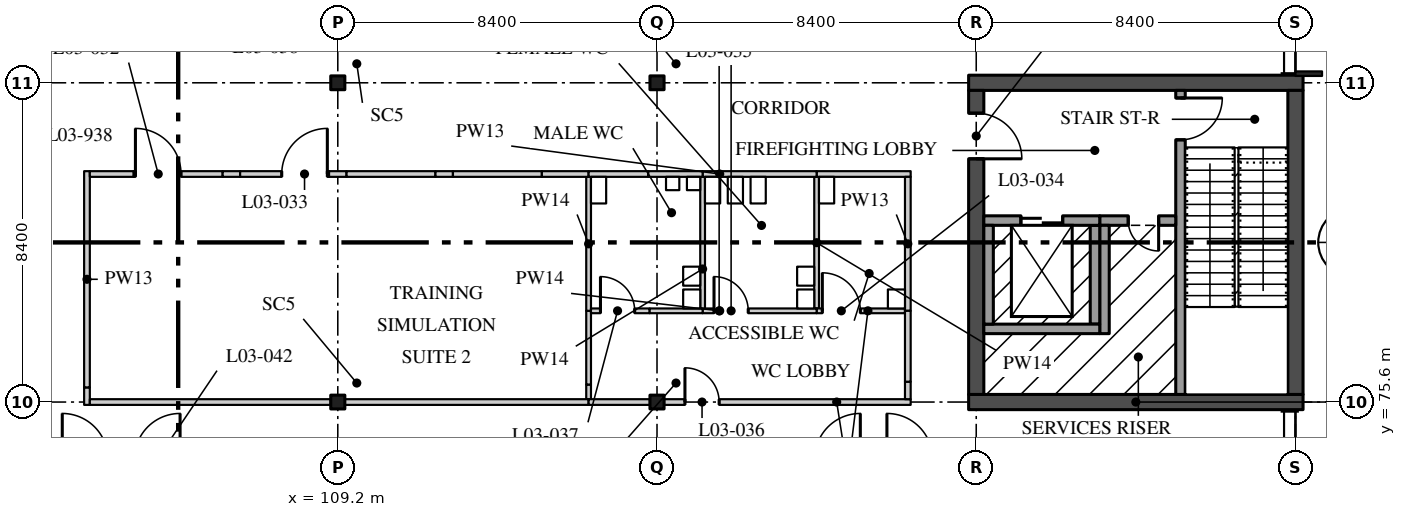
"""IFC4 building model, lengths in metres.
Left out: names, types, materials, properties, quantities, classifications, styles, units other than length and angle.
Written with IfcOpenShell. Run it as: python <this file> out.ifc"""

import sys

from ifc_helpers import new_model, si_unit, direction, frame, frame_2d, origin, origin_2d, place, context, subcontext, project, spatial, rectangle, i_section, extrude, element, fill, save


model = new_model("IFC4")
c1 = context("Model", 3, precision=1e-05, world=origin(), true_north=direction((0.0, 1.0)))
c2 = subcontext(c1, "Body", "Model", "MODEL_VIEW")
j1 = project(units=[si_unit("LENGTHUNIT", "METRE"), si_unit("PLANEANGLEUNIT", "RADIAN")], contexts=[c1])
p1 = place(None, origin())
s1 = spatial("IfcSite", under=j1, at=p1, CompositionType="ELEMENT")
p2 = place(p1, origin())
s2 = spatial("IfcBuilding", under=s1, at=p2, CompositionType="ELEMENT")
p3 = place(p2, frame((0.0, 0.0, 14.4)))
s3 = spatial("IfcBuildingStorey", under=s2, at=p3, CompositionType="ELEMENT", Elevation=14.4)
for number, where, z_axis, x_axis in (
    (1, (109.2, 75.6, 0.0), (0.0, 0.0, 1.0), (1.0, 0.0, 0.0)),
    (2, (109.2, 84.0, 0.0), (0.0, 0.0, 1.0), (1.0, 0.0, 0.0)),
    (3, (117.6, 75.6, 0.0), (0.0, 0.0, 1.0), (1.0, 0.0, 0.0)),
    (4, (117.6, 84.0, 0.0), (0.0, 0.0, 1.0), (1.0, 0.0, 0.0)),
):
    element("IfcColumn", number, at=place(p3, frame(where, z_axis=z_axis, x_axis=x_axis)), inside=s3, PredefinedType="COLUMN", context=c2, shape_type="SweptSolid", body=[
        extrude(i_section(OverallWidth=0.371, OverallDepth=0.363, WebThickness=0.013, FlangeThickness=0.022, FilletRadius=0.015, at=origin_2d()), origin(), (0.0, 0.0, 1.0), 4.37),
    ])
for number, where, z_axis, x_axis in (
    (5, (125.8, 75.6, 0.0), (0.0, 0.0, 1.0), (1.0, 0.0, 0.0)),
    (6, (125.8, 84.0, 0.0), (0.0, 0.0, 1.0), (1.0, 0.0, 0.0)),
):
    element("IfcWall", number, at=place(p3, frame(where, z_axis=z_axis, x_axis=x_axis)), inside=s3, PredefinedType="SHEAR", context=c2, shape_type="SweptSolid", body=[
        extrude(rectangle(XDim=8.8, YDim=0.4, at=frame_2d((4.4, 0.0))), origin(), (0.0, 0.0, 1.0), 4.37),
    ])
p4 = place(p3, frame((126.0, 75.8, 0.0), z_axis=(0.0, 0.0, 1.0), x_axis=(0.0, 1.0, 0.0)))
e7 = element("IfcWall", 7, at=p4, inside=s3, PredefinedType="SHEAR", context=c2, shape_type="SweptSolid", body=[
    extrude(rectangle(XDim=8.0, YDim=0.4, at=frame_2d((4.0, 0.0))), origin(), (0.0, 0.0, 1.0), 4.37),
])
p5 = place(p4, frame((6.2, 0.0, 0.0)))
e8 = element("IfcOpeningElement", 8, at=p5, cuts=e7, PredefinedType="OPENING", context=c2, shape_type="SweptSolid", body=[
    extrude(rectangle(XDim=1.2, YDim=2.1, at=frame_2d((0.6, 1.05))), frame((0.0, 0.21, 0.0), z_axis=(0.0, -1.0, 0.0), x_axis=(1.0, 0.0, 0.0)), (0.0, 0.0, 1.0), 0.42),
])
p6 = place(p3, frame((134.4, 75.8, 0.0), z_axis=(0.0, 0.0, 1.0), x_axis=(0.0, 1.0, 0.0)))
e9 = element("IfcWall", 9, at=p6, inside=s3, PredefinedType="SHEAR", context=c2, shape_type="SweptSolid", body=[
    extrude(rectangle(XDim=8.0, YDim=0.4, at=frame_2d((4.0, 0.0))), origin(), (0.0, 0.0, 1.0), 4.37),
])
p7 = place(p3, frame((131.375, 83.8, 0.0), z_axis=(0.0, 0.0, 1.0), x_axis=(0.0, -1.0, 0.0)))
e10 = element("IfcWall", 10, at=p7, inside=s3, PredefinedType="SOLIDWALL", context=c2, shape_type="SweptSolid", body=[
    extrude(rectangle(XDim=8.0, YDim=0.25, at=frame_2d((4.0, 0.0))), origin(), (0.0, 0.0, 1.0), 4.37),
])
p8 = place(p7, frame((0.2, 0.0, 0.0)))
e11 = element("IfcOpeningElement", 11, at=p8, cuts=e10, PredefinedType="OPENING", context=c2, shape_type="SweptSolid", body=[
    extrude(rectangle(XDim=1.1, YDim=2.1, at=frame_2d((0.55, 1.05))), frame((0.0, 0.135, 0.0), z_axis=(0.0, -1.0, 0.0), x_axis=(1.0, 0.0, 0.0)), (0.0, 0.0, 1.0), 0.27),
])
p9 = place(p3, frame((131.25, 80.375, 0.0), z_axis=(0.0, 0.0, 1.0), x_axis=(-1.0, 0.0, 0.0)))
e12 = element("IfcWall", 12, at=p9, inside=s3, PredefinedType="SOLIDWALL", context=c2, shape_type="SweptSolid", body=[
    extrude(rectangle(XDim=2.0, YDim=0.25, at=frame_2d((1.0, 0.0))), origin(), (0.0, 0.0, 1.0), 4.37),
])
p10 = place(p9, frame((0.45, 0.0, 0.0)))
e13 = element("IfcOpeningElement", 13, at=p10, cuts=e12, PredefinedType="OPENING", context=c2, shape_type="SweptSolid", body=[
    extrude(rectangle(XDim=0.8, YDim=2.1, at=frame_2d((0.4, 1.05))), frame((0.0, 0.135, 0.0), z_axis=(0.0, -1.0, 0.0), x_axis=(1.0, 0.0, 0.0)), (0.0, 0.0, 1.0), 0.27),
])
p11 = place(p3, frame((129.375, 80.25, 0.0), z_axis=(0.0, 0.0, 1.0), x_axis=(0.0, -1.0, 0.0)))
e14 = element("IfcWall", 14, at=p11, inside=s3, PredefinedType="SOLIDWALL", context=c2, shape_type="SweptSolid", body=[
    extrude(rectangle(XDim=2.85, YDim=0.25, at=frame_2d((1.425, 0.0))), origin(), (0.0, 0.0, 1.0), 4.37),
])
p12 = place(p3, frame((129.125, 77.65, 0.0), z_axis=(0.0, 0.0, 1.0), x_axis=(0.0, 1.0, 0.0)))
e15 = element("IfcWall", 15, at=p12, inside=s3, PredefinedType="SOLIDWALL", context=c2, shape_type="SweptSolid", body=[
    extrude(rectangle(XDim=2.6, YDim=0.25, at=frame_2d((1.3, 0.0))), origin(), (0.0, 0.0, 1.0), 4.37),
])
p13 = place(p3, frame((126.2, 80.375, 0.0), z_axis=(0.0, 0.0, 1.0), x_axis=(1.0, 0.0, 0.0)))
e16 = element("IfcWall", 16, at=p13, inside=s3, PredefinedType="SOLIDWALL", context=c2, shape_type="SweptSolid", body=[
    extrude(rectangle(XDim=3.05, YDim=0.25, at=frame_2d((1.525, 0.0))), origin(), (0.0, 0.0, 1.0), 4.37),
])
p14 = place(p13, frame((0.975, 0.0, 0.0)))
e17 = element("IfcOpeningElement", 17, at=p14, cuts=e16, PredefinedType="OPENING", context=c2, shape_type="SweptSolid", body=[
    extrude(rectangle(XDim=1.1, YDim=2.1, at=frame_2d((0.55, 1.05))), frame((0.0, 0.135, 0.0), z_axis=(0.0, -1.0, 0.0), x_axis=(1.0, 0.0, 0.0)), (0.0, 0.0, 1.0), 0.27),
])
p15 = place(p3, frame((126.2, 77.525, 0.0), z_axis=(0.0, 0.0, 1.0), x_axis=(1.0, 0.0, 0.0)))
e18 = element("IfcWall", 18, at=p15, inside=s3, PredefinedType="SOLIDWALL", context=c2, shape_type="SweptSolid", body=[
    extrude(rectangle(XDim=3.05, YDim=0.25, at=frame_2d((1.525, 0.0))), origin(), (0.0, 0.0, 1.0), 4.37),
])
p16 = place(p3, frame((126.325, 77.65, 0.0), z_axis=(0.0, 0.0, 1.0), x_axis=(0.0, 1.0, 0.0)))
e19 = element("IfcWall", 19, at=p16, inside=s3, PredefinedType="SOLIDWALL", context=c2, shape_type="SweptSolid", body=[
    extrude(rectangle(XDim=2.6, YDim=0.25, at=frame_2d((1.3, 0.0))), origin(), (0.0, 0.0, 1.0), 4.37),
])
p17 = place(p3, frame((115.8, 75.675, 0.0), z_axis=(0.0, 0.0, 1.0), x_axis=(0.0, 1.0, 0.0)))
e20 = element("IfcWall", 20, at=p17, inside=s3, PredefinedType="PARTITIONING", context=c2, shape_type="SweptSolid", body=[
    extrude(rectangle(XDim=0.385, YDim=0.125, at=frame_2d((0.192, 0.0))), origin(), (0.0, 0.0, 1.0), 3.746),
])
p18 = place(p3, frame((115.8, 76.06, 0.0), z_axis=(0.0, 0.0, 1.0), x_axis=(0.0, 1.0, 0.0)))
e21 = element("IfcWall", 21, at=p18, inside=s3, PredefinedType="PARTITIONING", context=c2, shape_type="SweptSolid", body=[
    extrude(rectangle(XDim=1.94, YDim=0.125, at=frame_2d((0.97, 0.0))), origin(), (0.0, 0.0, 1.0), 4.37),
])
p19 = place(p3, frame((115.8, 78.0, 0.0), z_axis=(0.0, 0.0, 1.0), x_axis=(0.0, 1.0, 0.0)))
e22 = element("IfcWall", 22, at=p19, inside=s3, PredefinedType="PARTITIONING", context=c2, shape_type="SweptSolid", body=[
    extrude(rectangle(XDim=3.525, YDim=0.125, at=frame_2d((1.762, 0.0))), origin(), (0.0, 0.0, 1.0), 4.37),
])
p20 = place(p3, frame((102.6, 75.525, 0.0), z_axis=(0.0, 0.0, 1.0), x_axis=(0.0, 1.0, 0.0)))
e23 = element("IfcWall", 23, at=p20, inside=s3, PredefinedType="PARTITIONING", context=c2, shape_type="SweptSolid", body=[
    extrude(rectangle(XDim=0.46, YDim=0.15, at=frame_2d((0.23, 0.0))), origin(), (0.0, 0.0, 1.0), 3.746),
])
p21 = place(p3, frame((102.6, 75.985, 0.0), z_axis=(0.0, 0.0, 1.0), x_axis=(0.0, 1.0, 0.0)))
e24 = element("IfcWall", 24, at=p21, inside=s3, PredefinedType="PARTITIONING", context=c2, shape_type="SweptSolid", body=[
    extrude(rectangle(XDim=5.69, YDim=0.15, at=frame_2d((2.845, 0.0))), origin(), (0.0, 0.0, 1.0), 4.37),
])
p22 = place(p3, frame((102.675, 75.6, 0.0), z_axis=(0.0, 0.0, 1.0), x_axis=(1.0, 0.0, 0.0)))
e25 = element("IfcWall", 25, at=p22, inside=s3, PredefinedType="PARTITIONING", context=c2, shape_type="SweptSolid", body=[
    extrude(rectangle(XDim=6.339, YDim=0.15, at=frame_2d((3.169, 0.0))), origin(), (0.0, 0.0, 1.0), 3.746),
])
p23 = place(p3, frame((109.386, 75.6, 0.0), z_axis=(0.0, 0.0, 1.0), x_axis=(1.0, 0.0, 0.0)))
e26 = element("IfcWall", 26, at=p23, inside=s3, PredefinedType="PARTITIONING", context=c2, shape_type="SweptSolid", body=[
    extrude(rectangle(XDim=6.414, YDim=0.15, at=frame_2d((3.207, 0.0))), origin(), (0.0, 0.0, 1.0), 3.746),
])
p24 = place(p3, frame((102.675, 81.6, 0.0), z_axis=(0.0, 0.0, 1.0), x_axis=(1.0, 0.0, 0.0)))
e27 = element("IfcWall", 27, at=p24, inside=s3, PredefinedType="PARTITIONING", context=c2, shape_type="SweptSolid", body=[
    extrude(rectangle(XDim=1.155, YDim=0.15, at=frame_2d((0.578, 0.0))), origin(), (0.0, 0.0, 1.0), 3.895),
])
p25 = place(p3, frame((103.83, 81.6, 0.0), z_axis=(0.0, 0.0, 1.0), x_axis=(1.0, 0.0, 0.0)))
e28 = element("IfcWall", 28, at=p25, inside=s3, PredefinedType="PARTITIONING", context=c2, shape_type="SweptSolid", body=[
    extrude(rectangle(XDim=2.34, YDim=0.15, at=frame_2d((1.17, 0.0))), origin(), (0.0, 0.0, 1.0), 4.37),
])
p26 = place(p25, frame((0.045, 0.0, 0.0)))
e29 = element("IfcOpeningElement", 29, at=p26, cuts=e28, PredefinedType="OPENING", context=c2, shape_type="SweptSolid", body=[
    extrude(rectangle(XDim=1.2, YDim=2.4, at=frame_2d((0.6, 1.2))), frame((0.0, 0.085, 0.0), z_axis=(0.0, -1.0, 0.0), x_axis=(1.0, 0.0, 0.0)), (0.0, 0.0, 1.0), 0.17),
])
p27 = place(p3, frame((106.17, 81.6, 0.0), z_axis=(0.0, 0.0, 1.0), x_axis=(1.0, 0.0, 0.0)))
e30 = element("IfcWall", 30, at=p27, inside=s3, PredefinedType="PARTITIONING", context=c2, shape_type="SweptSolid", body=[
    extrude(rectangle(XDim=0.46, YDim=0.15, at=frame_2d((0.23, 0.0))), origin(), (0.0, 0.0, 1.0), 3.895),
])
p28 = place(p3, frame((106.63, 81.6, 0.0), z_axis=(0.0, 0.0, 1.0), x_axis=(1.0, 0.0, 0.0)))
e31 = element("IfcWall", 31, at=p28, inside=s3, PredefinedType="PARTITIONING", context=c2, shape_type="SweptSolid", body=[
    extrude(rectangle(XDim=2.34, YDim=0.15, at=frame_2d((1.17, 0.0))), origin(), (0.0, 0.0, 1.0), 4.37),
])
p29 = place(p28, frame((1.095, 0.0, 0.0)))
e32 = element("IfcOpeningElement", 32, at=p29, cuts=e31, PredefinedType="OPENING", context=c2, shape_type="SweptSolid", body=[
    extrude(rectangle(XDim=1.2, YDim=2.4, at=frame_2d((0.6, 1.2))), frame((0.0, 0.085, 0.0), z_axis=(0.0, -1.0, 0.0), x_axis=(1.0, 0.0, 0.0)), (0.0, 0.0, 1.0), 0.17),
])
p30 = place(p3, frame((108.97, 81.6, 0.0), z_axis=(0.0, 0.0, 1.0), x_axis=(1.0, 0.0, 0.0)))
e33 = element("IfcWall", 33, at=p30, inside=s3, PredefinedType="PARTITIONING", context=c2, shape_type="SweptSolid", body=[
    extrude(rectangle(XDim=0.46, YDim=0.15, at=frame_2d((0.23, 0.0))), origin(), (0.0, 0.0, 1.0), 3.746),
])
p31 = place(p3, frame((109.43, 81.6, 0.0), z_axis=(0.0, 0.0, 1.0), x_axis=(1.0, 0.0, 0.0)))
e34 = element("IfcWall", 34, at=p31, inside=s3, PredefinedType="PARTITIONING", context=c2, shape_type="SweptSolid", body=[
    extrude(rectangle(XDim=2.34, YDim=0.15, at=frame_2d((1.17, 0.0))), origin(), (0.0, 0.0, 1.0), 4.37),
])
p32 = place(p3, frame((111.77, 81.6, 0.0), z_axis=(0.0, 0.0, 1.0), x_axis=(1.0, 0.0, 0.0)))
e35 = element("IfcWall", 35, at=p32, inside=s3, PredefinedType="PARTITIONING", context=c2, shape_type="SweptSolid", body=[
    extrude(rectangle(XDim=0.46, YDim=0.15, at=frame_2d((0.23, 0.0))), origin(), (0.0, 0.0, 1.0), 3.895),
])
p33 = place(p3, frame((112.23, 81.6, 0.0), z_axis=(0.0, 0.0, 1.0), x_axis=(1.0, 0.0, 0.0)))
e36 = element("IfcWall", 36, at=p33, inside=s3, PredefinedType="PARTITIONING", context=c2, shape_type="SweptSolid", body=[
    extrude(rectangle(XDim=2.34, YDim=0.15, at=frame_2d((1.17, 0.0))), origin(), (0.0, 0.0, 1.0), 4.37),
])
p34 = place(p3, frame((114.57, 81.6, 0.0), z_axis=(0.0, 0.0, 1.0), x_axis=(1.0, 0.0, 0.0)))
e37 = element("IfcWall", 37, at=p34, inside=s3, PredefinedType="PARTITIONING", context=c2, shape_type="SweptSolid", body=[
    extrude(rectangle(XDim=1.23, YDim=0.15, at=frame_2d((0.615, 0.0))), origin(), (0.0, 0.0, 1.0), 3.895),
])
p35 = place(p3, frame((121.8, 78.062, 0.0), z_axis=(0.0, 0.0, 1.0), x_axis=(0.0, 1.0, 0.0)))
e38 = element("IfcWall", 38, at=p35, inside=s3, PredefinedType="PARTITIONING", context=c2, shape_type="SweptSolid", body=[
    extrude(rectangle(XDim=3.463, YDim=0.125, at=frame_2d((1.731, 0.0))), origin(), (0.0, 0.0, 1.0), 4.37),
])
p36 = place(p3, frame((121.8, 78.0, 0.0), z_axis=(0.0, 0.0, 1.0), x_axis=(1.0, 0.0, 0.0)))
e39 = element("IfcWall", 39, at=p36, inside=s3, PredefinedType="PARTITIONING", context=c2, shape_type="SweptSolid", body=[
    extrude(rectangle(XDim=2.325, YDim=0.125, at=frame_2d((1.163, 0.0))), origin(), (0.0, 0.0, 1.0), 3.895),
])
p37 = place(p36, frame((0.15, 0.0, 0.0)))
e40 = element("IfcOpeningElement", 40, at=p37, cuts=e39, PredefinedType="OPENING", context=c2, shape_type="SweptSolid", body=[
    extrude(rectangle(XDim=1.0, YDim=2.1, at=frame_2d((0.5, 1.05))), frame((0.0, 0.073, 0.0), z_axis=(0.0, -1.0, 0.0), x_axis=(1.0, 0.0, 0.0)), (0.0, 0.0, 1.0), 0.145),
])
p38 = place(p3, frame((121.8, 81.6, 0.0), z_axis=(0.0, 0.0, 1.0), x_axis=(1.0, 0.0, 0.0)))
e41 = element("IfcWall", 41, at=p38, inside=s3, PredefinedType="PARTITIONING", context=c2, shape_type="SweptSolid", body=[
    extrude(rectangle(XDim=2.475, YDim=0.15, at=frame_2d((1.237, 0.0))), origin(), (0.0, 0.0, 1.0), 3.895),
])
p39 = place(p3, frame((124.2, 78.0, 0.0), z_axis=(0.0, 0.0, 1.0), x_axis=(0.0, 1.0, 0.0)))
e42 = element("IfcWall", 42, at=p39, inside=s3, PredefinedType="PARTITIONING", context=c2, shape_type="SweptSolid", body=[
    extrude(rectangle(XDim=3.525, YDim=0.15, at=frame_2d((1.762, 0.0))), origin(), (0.0, 0.0, 1.0), 4.37),
])
p40 = place(p3, frame((118.8, 78.0, 0.0), z_axis=(0.0, 0.0, 1.0), x_axis=(1.0, 0.0, 0.0)))
e43 = element("IfcWall", 43, at=p40, inside=s3, PredefinedType="PARTITIONING", context=c2, shape_type="SweptSolid", body=[
    extrude(rectangle(XDim=3.0, YDim=0.125, at=frame_2d((1.5, 0.0))), origin(), (0.0, 0.0, 1.0), 3.895),
])
p41 = place(p40, frame((0.3, 0.0, 0.0)))
e44 = element("IfcOpeningElement", 44, at=p41, cuts=e43, PredefinedType="OPENING", context=c2, shape_type="SweptSolid", body=[
    extrude(rectangle(XDim=0.9, YDim=2.1, at=frame_2d((0.45, 1.05))), frame((0.0, 0.073, 0.0), z_axis=(0.0, -1.0, 0.0), x_axis=(1.0, 0.0, 0.0)), (0.0, 0.0, 1.0), 0.145),
])
p42 = place(p3, frame((118.8, 78.062, 0.0), z_axis=(0.0, 0.0, 1.0), x_axis=(0.0, 1.0, 0.0)))
e45 = element("IfcWall", 45, at=p42, inside=s3, PredefinedType="PARTITIONING", context=c2, shape_type="SweptSolid", body=[
    extrude(rectangle(XDim=3.463, YDim=0.125, at=frame_2d((1.731, 0.0))), origin(), (0.0, 0.0, 1.0), 4.37),
])
p43 = place(p3, frame((118.8, 81.6, 0.0), z_axis=(0.0, 0.0, 1.0), x_axis=(1.0, 0.0, 0.0)))
e46 = element("IfcWall", 46, at=p43, inside=s3, PredefinedType="PARTITIONING", context=c2, shape_type="SweptSolid", body=[
    extrude(rectangle(XDim=3.0, YDim=0.15, at=frame_2d((1.5, 0.0))), origin(), (0.0, 0.0, 1.0), 3.895),
])
p44 = place(p3, frame((115.862, 78.0, 0.0), z_axis=(0.0, 0.0, 1.0), x_axis=(1.0, 0.0, 0.0)))
e47 = element("IfcWall", 47, at=p44, inside=s3, PredefinedType="PARTITIONING", context=c2, shape_type="SweptSolid", body=[
    extrude(rectangle(XDim=1.545, YDim=0.125, at=frame_2d((0.772, 0.0))), origin(), (0.0, 0.0, 1.0), 4.37),
])
p45 = place(p44, frame((0.25, 0.0, 0.0)))
e48 = element("IfcOpeningElement", 48, at=p45, cuts=e47, PredefinedType="OPENING", context=c2, shape_type="SweptSolid", body=[
    extrude(rectangle(XDim=0.9, YDim=2.1, at=frame_2d((0.45, 1.05))), frame((0.0, 0.073, 0.0), z_axis=(0.0, -1.0, 0.0), x_axis=(1.0, 0.0, 0.0)), (0.0, 0.0, 1.0), 0.145),
])
p46 = place(p3, frame((117.407, 78.0, 0.0), z_axis=(0.0, 0.0, 1.0), x_axis=(1.0, 0.0, 0.0)))
e49 = element("IfcWall", 49, at=p46, inside=s3, PredefinedType="PARTITIONING", context=c2, shape_type="SweptSolid", body=[
    extrude(rectangle(XDim=1.393, YDim=0.125, at=frame_2d((0.697, 0.0))), origin(), (0.0, 0.0, 1.0), 3.746),
])
p47 = place(p3, frame((115.8, 75.6, 0.0), z_axis=(0.0, 0.0, 1.0), x_axis=(1.0, 0.0, 0.0)))
e50 = element("IfcWall", 50, at=p47, inside=s3, PredefinedType="PARTITIONING", context=c2, shape_type="SweptSolid", body=[
    extrude(rectangle(XDim=1.614, YDim=0.15, at=frame_2d((0.807, 0.0))), origin(), (0.0, 0.0, 1.0), 3.746),
])
p48 = place(p3, frame((117.785, 75.6, 0.0), z_axis=(0.0, 0.0, 1.0), x_axis=(1.0, 0.0, 0.0)))
e51 = element("IfcWall", 51, at=p48, inside=s3, PredefinedType="PARTITIONING", context=c2, shape_type="SweptSolid", body=[
    extrude(rectangle(XDim=6.49, YDim=0.15, at=frame_2d((3.245, 0.0))), origin(), (0.0, 0.0, 1.0), 3.746),
])
p49 = place(p48, frame((0.55, 0.0, 0.0)))
e52 = element("IfcOpeningElement", 52, at=p49, cuts=e51, PredefinedType="OPENING", context=c2, shape_type="SweptSolid", body=[
    extrude(rectangle(XDim=0.9, YDim=2.1, at=frame_2d((0.45, 1.05))), frame((0.0, 0.085, 0.0), z_axis=(0.0, -1.0, 0.0), x_axis=(1.0, 0.0, 0.0)), (0.0, 0.0, 1.0), 0.17),
])
p50 = place(p3, frame((124.2, 75.675, 0.0), z_axis=(0.0, 0.0, 1.0), x_axis=(0.0, 1.0, 0.0)))
e53 = element("IfcWall", 53, at=p50, inside=s3, PredefinedType="PARTITIONING", context=c2, shape_type="SweptSolid", body=[
    extrude(rectangle(XDim=0.46, YDim=0.15, at=frame_2d((0.23, 0.0))), origin(), (0.0, 0.0, 1.0), 3.746),
])
p51 = place(p3, frame((124.2, 76.135, 0.0), z_axis=(0.0, 0.0, 1.0), x_axis=(0.0, 1.0, 0.0)))
e54 = element("IfcWall", 54, at=p51, inside=s3, PredefinedType="PARTITIONING", context=c2, shape_type="SweptSolid", body=[
    extrude(rectangle(XDim=1.865, YDim=0.15, at=frame_2d((0.933, 0.0))), origin(), (0.0, 0.0, 1.0), 4.37),
])
p52 = place(p3, frame((115.8, 81.6, 0.0), z_axis=(0.0, 0.0, 1.0), x_axis=(1.0, 0.0, 0.0)))
e55 = element("IfcWall", 55, at=p52, inside=s3, PredefinedType="PARTITIONING", context=c2, shape_type="SweptSolid", body=[
    extrude(rectangle(XDim=1.57, YDim=0.15, at=frame_2d((0.785, 0.0))), origin(), (0.0, 0.0, 1.0), 4.37),
])
p53 = place(p3, frame((117.37, 81.6, 0.0), z_axis=(0.0, 0.0, 1.0), x_axis=(1.0, 0.0, 0.0)))
e56 = element("IfcWall", 56, at=p53, inside=s3, PredefinedType="PARTITIONING", context=c2, shape_type="SweptSolid", body=[
    extrude(rectangle(XDim=1.43, YDim=0.15, at=frame_2d((0.715, 0.0))), origin(), (0.0, 0.0, 1.0), 3.746),
])
p54 = place(p5, frame((1.2, 0.0, 0.0), z_axis=(0.0, 0.0, 1.0), x_axis=(-1.0, 0.0, 0.0)))
e57 = element("IfcDoor", 57, at=p54, inside=s3, OperationType="SINGLE_SWING_LEFT", PredefinedType="DOOR", context=c2, shape_type="SweptSolid", body=[
    extrude(rectangle(XDim=1.2, YDim=2.1, at=frame_2d((0.6, 1.05))), frame((0.0, 0.035, 0.0), z_axis=(0.0, -1.0, 0.0), x_axis=(1.0, 0.0, 0.0)), (0.0, 0.0, 1.0), 0.07),
])
fill(e8, e57)
p55 = place(p10, origin())
e58 = element("IfcDoor", 58, at=p55, inside=s3, OperationType="SINGLE_SWING_RIGHT", PredefinedType="DOOR", context=c2, shape_type="SweptSolid", body=[
    extrude(rectangle(XDim=0.8, YDim=2.1, at=frame_2d((0.4, 1.05))), frame((0.0, 0.035, 0.0), z_axis=(0.0, -1.0, 0.0), x_axis=(1.0, 0.0, 0.0)), (0.0, 0.0, 1.0), 0.07),
])
fill(e13, e58)
p56 = place(p8, origin())
e59 = element("IfcDoor", 59, at=p56, inside=s3, OperationType="SINGLE_SWING_RIGHT", PredefinedType="DOOR", context=c2, shape_type="SweptSolid", body=[
    extrude(rectangle(XDim=1.1, YDim=2.1, at=frame_2d((0.55, 1.05))), frame((0.0, 0.035, 0.0), z_axis=(0.0, -1.0, 0.0), x_axis=(1.0, 0.0, 0.0)), (0.0, 0.0, 1.0), 0.07),
])
fill(e11, e59)
p57 = place(p14, origin())
e60 = element("IfcDoor", 60, at=p57, inside=s3, OperationType="DOUBLE_DOOR_SLIDING", PredefinedType="DOOR", context=c2, shape_type="SweptSolid", body=[
    extrude(rectangle(XDim=1.1, YDim=2.1, at=frame_2d((0.55, 1.05))), frame((0.0, 0.04, 0.0), z_axis=(0.0, -1.0, 0.0), x_axis=(1.0, 0.0, 0.0)), (0.0, 0.0, 1.0), 0.08),
])
fill(e17, e60)
p58 = place(p26, origin())
e61 = element("IfcDoor", 61, at=p58, inside=s3, OperationType="SINGLE_SWING_RIGHT", PredefinedType="DOOR", context=c2, shape_type="SweptSolid", body=[
    extrude(rectangle(XDim=1.2, YDim=2.4, at=frame_2d((0.6, 1.2))), frame((0.0, 0.025, 0.0), z_axis=(0.0, -1.0, 0.0), x_axis=(1.0, 0.0, 0.0)), (0.0, 0.0, 1.0), 0.05),
])
fill(e29, e61)
p59 = place(p29, origin())
e62 = element("IfcDoor", 62, at=p59, inside=s3, OperationType="SINGLE_SWING_LEFT", PredefinedType="DOOR", context=c2, shape_type="SweptSolid", body=[
    extrude(rectangle(XDim=1.2, YDim=2.4, at=frame_2d((0.6, 1.2))), frame((0.0, 0.025, 0.0), z_axis=(0.0, -1.0, 0.0), x_axis=(1.0, 0.0, 0.0)), (0.0, 0.0, 1.0), 0.05),
])
fill(e32, e62)
p60 = place(p37, origin())
e63 = element("IfcDoor", 63, at=p60, inside=s3, OperationType="SINGLE_SWING_RIGHT", PredefinedType="DOOR", context=c2, shape_type="SweptSolid", body=[
    extrude(rectangle(XDim=1.0, YDim=2.1, at=frame_2d((0.5, 1.05))), frame((0.0, 0.02, 0.0), z_axis=(0.0, -1.0, 0.0), x_axis=(1.0, 0.0, 0.0)), (0.0, 0.0, 1.0), 0.04),
])
fill(e40, e63)
p61 = place(p41, origin())
e64 = element("IfcDoor", 64, at=p61, inside=s3, OperationType="SINGLE_SWING_RIGHT", PredefinedType="DOOR", context=c2, shape_type="SweptSolid", body=[
    extrude(rectangle(XDim=0.9, YDim=2.1, at=frame_2d((0.45, 1.05))), frame((0.0, 0.02, 0.0), z_axis=(0.0, -1.0, 0.0), x_axis=(1.0, 0.0, 0.0)), (0.0, 0.0, 1.0), 0.04),
])
fill(e44, e64)
p62 = place(p49, origin())
e65 = element("IfcDoor", 65, at=p62, inside=s3, OperationType="SINGLE_SWING_RIGHT", PredefinedType="DOOR", context=c2, shape_type="SweptSolid", body=[
    extrude(rectangle(XDim=0.9, YDim=2.1, at=frame_2d((0.45, 1.05))), frame((0.0, 0.025, 0.0), z_axis=(0.0, -1.0, 0.0), x_axis=(1.0, 0.0, 0.0)), (0.0, 0.0, 1.0), 0.05),
])
fill(e52, e65)
p63 = place(p45, origin())
e66 = element("IfcDoor", 66, at=p63, inside=s3, OperationType="SINGLE_SWING_RIGHT", PredefinedType="DOOR", context=c2, shape_type="SweptSolid", body=[
    extrude(rectangle(XDim=0.9, YDim=2.1, at=frame_2d((0.45, 1.05))), frame((0.0, 0.02, 0.0), z_axis=(0.0, -1.0, 0.0), x_axis=(1.0, 0.0, 0.0)), (0.0, 0.0, 1.0), 0.04),
])
fill(e48, e66)
save(model, sys.argv[1])
